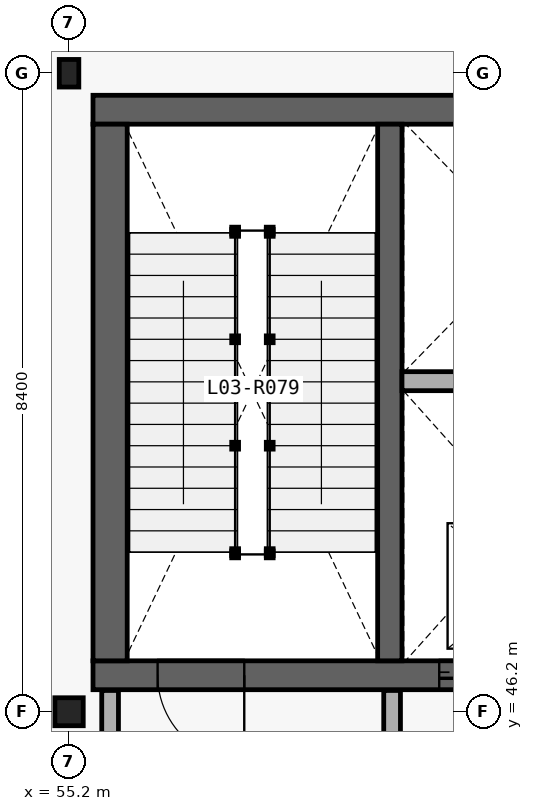
"""IFC4 building model, lengths in metres.
Left out: names, types, materials, properties, quantities, classifications, styles, units other than length and angle.
Written with IfcOpenShell. Run it as: python <this file> out.ifc"""

import sys

from ifc_helpers import new_model, si_unit, direction, frame, frame_2d, origin_with_axes, origin_2d_with_axis, place, context, subcontext, project, spatial, rectangle, i_section, extrude, element, fill, save


model = new_model("IFC4")
c1 = context("Model", 3, precision=1e-05, world=origin_with_axes(), true_north=direction((0.0, 1.0)))
c2 = subcontext(c1, "Body", "Model", "MODEL_VIEW")
j1 = project(units=[si_unit("LENGTHUNIT", "METRE"), si_unit("PLANEANGLEUNIT", "RADIAN")], contexts=[c1])
p1 = place(None, origin_with_axes())
s1 = spatial("IfcSite", under=j1, at=p1, CompositionType="ELEMENT")
p2 = place(p1, origin_with_axes())
s2 = spatial("IfcBuilding", under=s1, at=p2, CompositionType="ELEMENT")
p3 = place(p2, frame((0.0, 0.0, 15.6), z_axis=(0.0, 0.0, 1.0), x_axis=(1.0, 0.0, 0.0)))
s3 = spatial("IfcBuildingStorey", under=s2, at=p3, CompositionType="ELEMENT", Elevation=15.6)
p4 = place(None, frame((55.515, 46.68, 15.6), z_axis=(0.0, 0.0, 1.0), x_axis=(1.0, 0.0, 0.0)))
e1 = element("IfcWall", 1, at=p4, inside=s3, PredefinedType="SHEAR", context=c2, shape_type="SweptSolid", body=[
    extrude(rectangle(XDim=7.77, YDim=0.38, at=frame_2d((3.885, 0.0), x_axis=(1.0, 0.0))), origin_with_axes(), (0.0, 0.0, 1.0), 4.8),
])
p5 = place(None, frame((56.935, 46.68, 15.6), z_axis=(0.0, 0.0, 1.0), x_axis=(1.0, 0.0, 0.0)))
e2 = element("IfcOpeningElement", 2, at=p5, cuts=e1, PredefinedType="OPENING", context=c2, shape_type="SweptSolid", body=[
    extrude(rectangle(XDim=1.14, YDim=2.18, at=frame_2d((0.0, 1.09), x_axis=(1.0, 0.0))), frame((0.0, 0.2, 0.0), z_axis=(0.0, -1.0, 0.0), x_axis=(1.0, 0.0, 0.0)), (0.0, 0.0, 1.0), 0.4),
])
p6 = place(None, frame((60.65, 46.68, 15.6), z_axis=(0.0, 0.0, 1.0), x_axis=(1.0, 0.0, 0.0)))
e3 = element("IfcOpeningElement", 3, at=p6, cuts=e1, PredefinedType="OPENING", context=c2, shape_type="SweptSolid", body=[
    extrude(rectangle(XDim=1.16, YDim=2.2, at=frame_2d((0.0, 1.1), x_axis=(1.0, 0.0))), frame((0.0, 0.2, 0.0), z_axis=(0.0, -1.0, 0.0), x_axis=(1.0, 0.0, 0.0)), (0.0, 0.0, 1.0), 0.4),
])
p7 = place(None, frame((63.285, 54.12, 15.6), z_axis=(0.0, 0.0, 1.0), x_axis=(-1.0, 0.0, 0.0)))
e4 = element("IfcWall", 4, at=p7, inside=s3, PredefinedType="SHEAR", context=c2, shape_type="SweptSolid", body=[
    extrude(rectangle(XDim=7.77, YDim=0.38, at=frame_2d((3.885, 0.0), x_axis=(1.0, 0.0))), origin_with_axes(), (0.0, 0.0, 1.0), 4.8),
])
p8 = place(None, frame((55.74, 53.93, 15.6), z_axis=(0.0, 0.0, 1.0), x_axis=(0.0, -1.0, 0.0)))
e5 = element("IfcWall", 5, at=p8, inside=s3, PredefinedType="SHEAR", context=c2, shape_type="SweptSolid", body=[
    extrude(rectangle(XDim=7.06, YDim=0.45, at=frame_2d((3.53, 0.0), x_axis=(1.0, 0.0))), origin_with_axes(), (0.0, 0.0, 1.0), 4.8),
])
p9 = place(None, frame((59.42, 46.87, 15.6), z_axis=(0.0, 0.0, 1.0), x_axis=(0.0, 1.0, 0.0)))
e6 = element("IfcWall", 6, at=p9, inside=s3, PredefinedType="SHEAR", context=c2, shape_type="SweptSolid", body=[
    extrude(rectangle(XDim=7.06, YDim=0.32, at=frame_2d((3.53, 0.0), x_axis=(1.0, 0.0))), origin_with_axes(), (0.0, 0.0, 1.0), 4.8),
])
p10 = place(None, frame((59.58, 50.549, 15.6), z_axis=(0.0, 0.0, 1.0), x_axis=(1.0, 0.0, 0.0)))
e7 = element("IfcWall", 7, at=p10, inside=s3, PredefinedType="PARTITIONING", context=c2, shape_type="SweptSolid", body=[
    extrude(rectangle(XDim=3.255, YDim=0.25, at=frame_2d((1.627, 0.0), x_axis=(1.0, 0.0))), origin_with_axes(), (0.0, 0.0, 1.0), 4.48),
])
for number, where, z_axis, x_axis in (
    (8, (55.74, 45.22, 15.6), (0.0, 0.0, 1.0), (0.0, 1.0, 0.0)),
    (9, (59.45, 45.22, 15.6), (0.0, 0.0, 1.0), (0.0, 1.0, 0.0)),
):
    element("IfcWall", number, at=place(None, frame(where, z_axis=z_axis, x_axis=x_axis)), inside=s3, PredefinedType="PARTITIONING", context=c2, shape_type="SweptSolid", body=[
        extrude(rectangle(XDim=1.26, YDim=0.22, at=frame_2d((0.63, 0.0), x_axis=(1.0, 0.0))), origin_with_axes(), (0.0, 0.0, 1.0), 4.48),
    ])
p11 = place(None, frame((55.2, 46.2, 15.6), z_axis=(0.0, 0.0, 1.0), x_axis=(1.0, 0.0, 0.0)))
e10 = element("IfcColumn", 10, at=p11, inside=s3, PredefinedType="COLUMN", context=c2, shape_type="SweptSolid", body=[
    extrude(i_section(OverallWidth=0.373, OverallDepth=0.368, WebThickness=0.015, FlangeThickness=0.024, at=origin_2d_with_axis()), origin_with_axes(), (0.0, 0.0, 1.0), 4.8),
])
p12 = place(None, frame((55.2, 54.6, 15.6), z_axis=(0.0, 0.0, 1.0), x_axis=(1.0, 0.0, 0.0)))
e11 = element("IfcColumn", 11, at=p12, inside=s3, PredefinedType="COLUMN", context=c2, shape_type="SweptSolid", body=[
    extrude(i_section(OverallWidth=0.257, OverallDepth=0.363, WebThickness=0.013, FlangeThickness=0.022, at=origin_2d_with_axis()), origin_with_axes(), (0.0, 0.0, 1.0), 4.8),
])
p13 = place(None, frame((56.935, 46.68, 15.6), z_axis=(0.0, 0.0, 1.0), x_axis=(-1.0, 0.0, 0.0)))
e12 = element("IfcDoor", 12, at=p13, inside=s3, OperationType="SINGLE_SWING_RIGHT", PredefinedType="DOOR", context=c2, shape_type="SweptSolid", body=[
    extrude(rectangle(XDim=1.14, YDim=2.18, at=frame_2d((0.0, 1.09), x_axis=(1.0, 0.0))), frame((0.0, 0.04, 0.0), z_axis=(0.0, -1.0, 0.0), x_axis=(1.0, 0.0, 0.0)), (0.0, 0.0, 1.0), 0.08),
])
fill(e2, e12)
p14 = place(None, frame((60.65, 46.68, 15.6), z_axis=(0.0, 0.0, 1.0), x_axis=(-1.0, 0.0, 0.0)))
e13 = element("IfcDoor", 13, at=p14, inside=s3, OperationType="SLIDING_TO_LEFT", PredefinedType="DOOR", context=c2, shape_type="SweptSolid", body=[
    extrude(rectangle(XDim=1.16, YDim=2.2, at=frame_2d((0.0, 1.1), x_axis=(1.0, 0.0))), frame((0.0, 0.04, 0.0), z_axis=(0.0, -1.0, 0.0), x_axis=(1.0, 0.0, 0.0)), (0.0, 0.0, 1.0), 0.08),
])
fill(e3, e13)
save(model, sys.argv[1])
